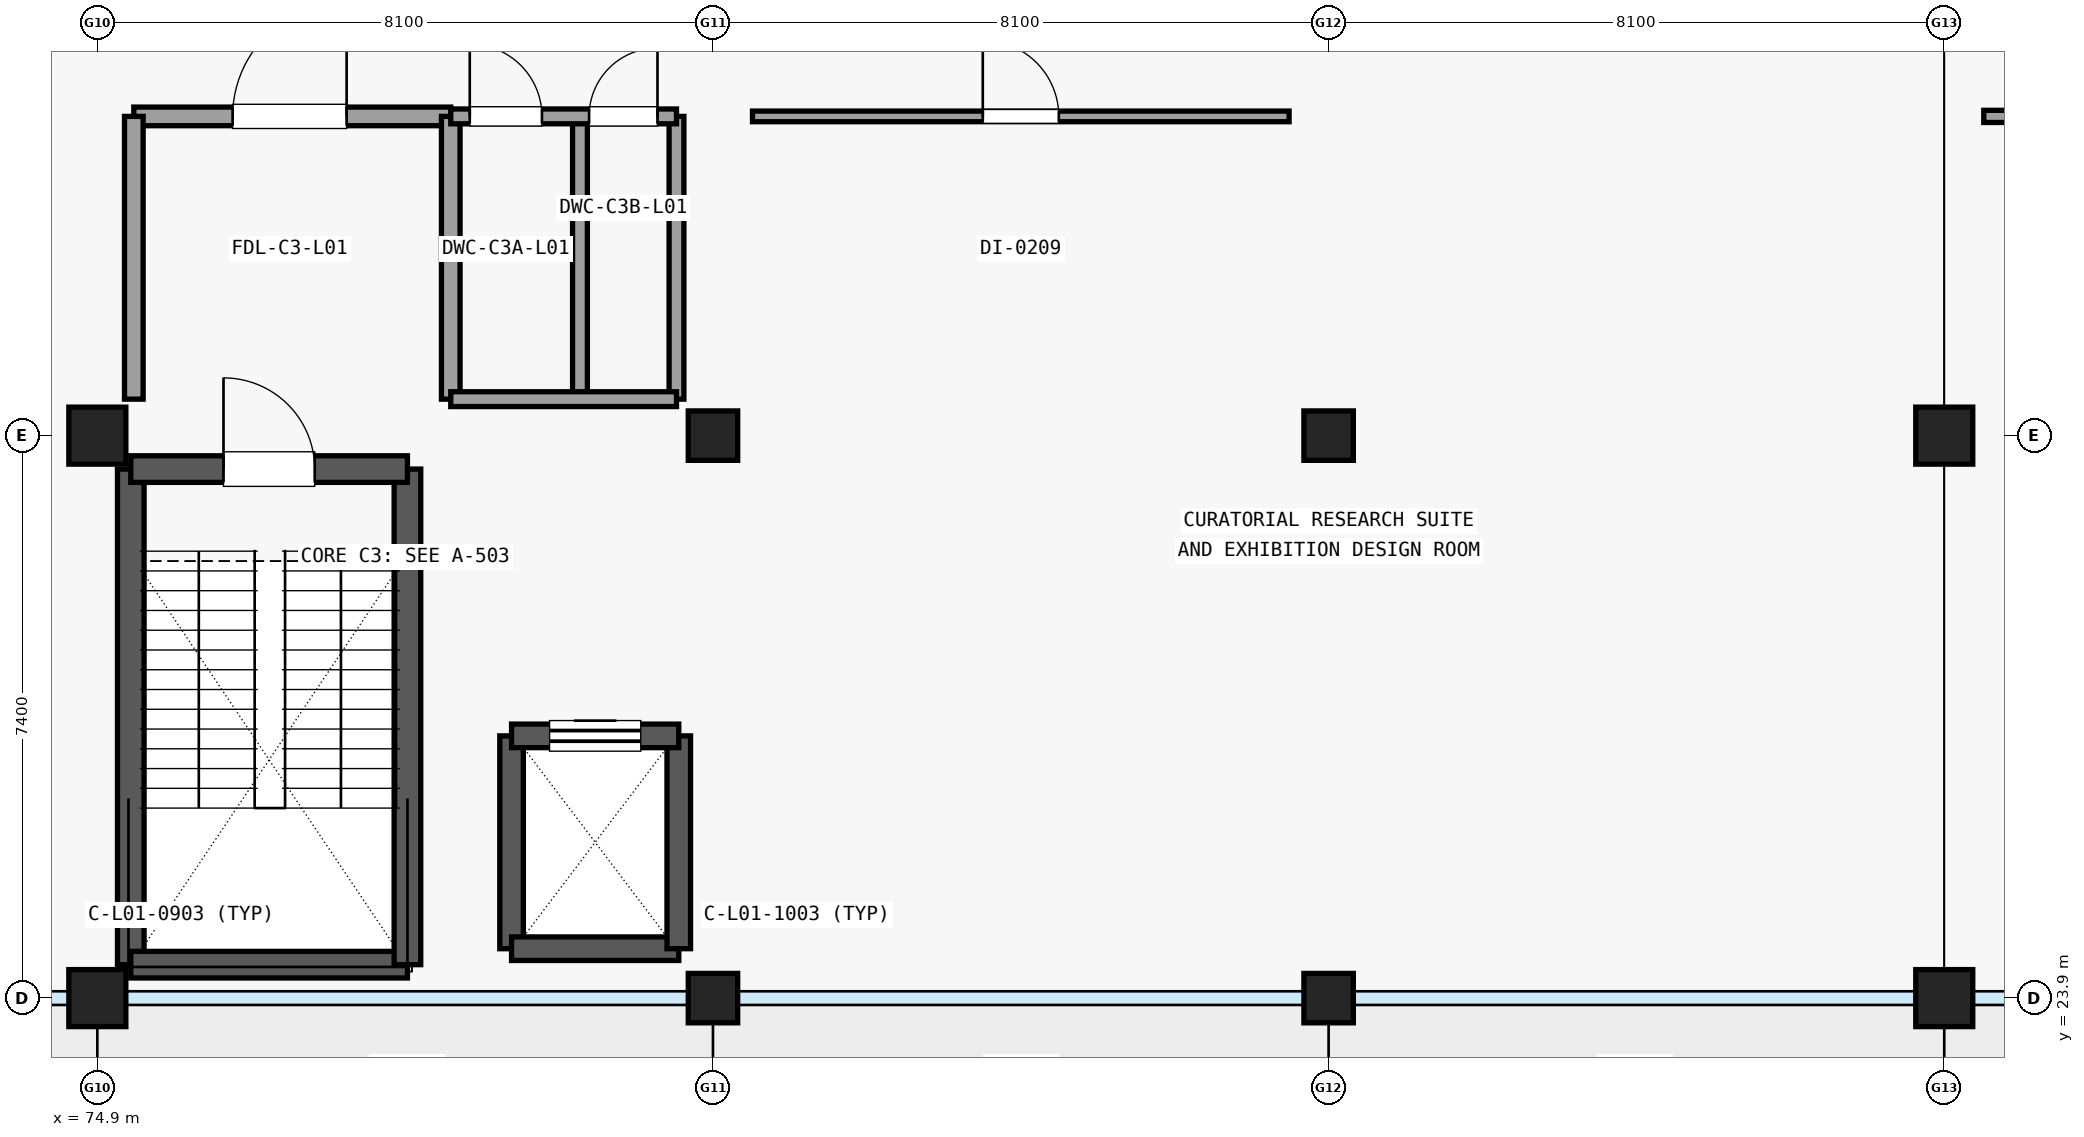
"""IFC4 building model, lengths in metres.
Left out: names, types, materials, properties, quantities, classifications, styles, units other than length and angle.
Written with IfcOpenShell. Run it as: python <this file> out.ifc"""

import sys

from ifc_helpers import new_model, si_unit, direction, frame, frame_2d, origin, origin_2d, place, context, subcontext, project, spatial, rectangle, extrude, element, fill, save


model = new_model("IFC4")
c1 = context("Model", 3, precision=1e-05, world=origin(), true_north=direction((0.0, 1.0)))
c2 = subcontext(c1, "Body", "Model", "MODEL_VIEW")
j1 = project(units=[si_unit("LENGTHUNIT", "METRE"), si_unit("PLANEANGLEUNIT", "RADIAN")], contexts=[c1])
p1 = place(None, origin())
s1 = spatial("IfcSite", under=j1, at=p1, CompositionType="ELEMENT")
p2 = place(p1, origin())
s2 = spatial("IfcBuilding", under=s1, at=p2, CompositionType="ELEMENT")
p3 = place(p2, frame((0.0, 0.0, 5.4)))
s3 = spatial("IfcBuildingStorey", under=s2, at=p3, CompositionType="ELEMENT", Elevation=5.4)
for number, where, z_axis, x_axis in (
    (1, (74.9, 23.9, 0.0), (0.0, 0.0, 1.0), (1.0, 0.0, 0.0)),
    (2, (74.9, 31.3, 0.0), (0.0, 0.0, 1.0), (1.0, 0.0, 0.0)),
):
    element("IfcColumn", number, at=place(p3, frame(where, z_axis=z_axis, x_axis=x_axis)), inside=s3, PredefinedType="COLUMN", context=c2, shape_type="SweptSolid", body=[
        extrude(rectangle(XDim=0.75, YDim=0.75, at=origin_2d()), origin(), (0.0, 0.0, 1.0), 4.56),
    ])
for number, where, z_axis, x_axis in (
    (3, (83.0, 23.9, 0.0), (0.0, 0.0, 1.0), (1.0, 0.0, 0.0)),
    (4, (83.0, 31.3, 0.0), (0.0, 0.0, 1.0), (1.0, 0.0, 0.0)),
    (5, (91.1, 23.9, 0.0), (0.0, 0.0, 1.0), (1.0, 0.0, 0.0)),
    (6, (91.1, 31.3, 0.0), (0.0, 0.0, 1.0), (1.0, 0.0, 0.0)),
):
    element("IfcColumn", number, at=place(p3, frame(where, z_axis=z_axis, x_axis=x_axis)), inside=s3, PredefinedType="COLUMN", context=c2, shape_type="SweptSolid", body=[
        extrude(rectangle(XDim=0.65, YDim=0.65, at=origin_2d()), origin(), (0.0, 0.0, 1.0), 4.56),
    ])
for number, where, z_axis, x_axis in (
    (7, (99.2, 23.9, 0.0), (0.0, 0.0, 1.0), (1.0, 0.0, 0.0)),
    (8, (99.2, 31.3, 0.0), (0.0, 0.0, 1.0), (1.0, 0.0, 0.0)),
):
    element("IfcColumn", number, at=place(p3, frame(where, z_axis=z_axis, x_axis=x_axis)), inside=s3, PredefinedType="COLUMN", context=c2, shape_type="SweptSolid", body=[
        extrude(rectangle(XDim=0.75, YDim=0.75, at=origin_2d()), origin(), (0.0, 0.0, 1.0), 4.56),
    ])
p4 = place(p3, frame((75.34, 24.34, 0.0), z_axis=(0.0, 0.0, 1.0), x_axis=(0.0, 1.0, 0.0)))
e9 = element("IfcWall", 9, at=p4, inside=s3, PredefinedType="SHEAR", context=c2, shape_type="SweptSolid", body=[
    extrude(rectangle(XDim=6.52, YDim=0.35, at=frame_2d((3.26, 0.0))), origin(), (0.0, 0.0, 1.0), 4.555),
])
p5 = place(p3, frame((75.34, 24.34, 0.0), z_axis=(0.0, 0.0, 1.0), x_axis=(1.0, 0.0, 0.0)))
e10 = element("IfcWall", 10, at=p5, inside=s3, PredefinedType="SHEAR", context=c2, shape_type="SweptSolid", body=[
    extrude(rectangle(XDim=3.64, YDim=0.35, at=frame_2d((1.82, 0.0))), origin(), (0.0, 0.0, 1.0), 4.555),
])
p6 = place(p3, frame((78.98, 24.34, 0.0), z_axis=(0.0, 0.0, 1.0), x_axis=(0.0, 1.0, 0.0)))
e11 = element("IfcWall", 11, at=p6, inside=s3, PredefinedType="SHEAR", context=c2, shape_type="SweptSolid", body=[
    extrude(rectangle(XDim=6.52, YDim=0.35, at=frame_2d((3.26, 0.0))), origin(), (0.0, 0.0, 1.0), 4.555),
])
p7 = place(p3, frame((75.34, 30.86, 0.0), z_axis=(0.0, 0.0, 1.0), x_axis=(1.0, 0.0, 0.0)))
e12 = element("IfcWall", 12, at=p7, inside=s3, PredefinedType="SHEAR", context=c2, shape_type="SweptSolid", body=[
    extrude(rectangle(XDim=3.64, YDim=0.35, at=frame_2d((1.82, 0.0))), origin(), (0.0, 0.0, 1.0), 4.555),
])
p8 = place(p7, frame((1.22, 0.0, 0.0)))
e13 = element("IfcOpeningElement", 13, at=p8, cuts=e12, PredefinedType="OPENING", context=c2, shape_type="SweptSolid", body=[
    extrude(rectangle(XDim=1.2, YDim=2.15, at=frame_2d((0.6, 1.075))), frame((0.0, 0.185, 0.0), z_axis=(0.0, -1.0, 0.0), x_axis=(1.0, 0.0, 0.0)), (0.0, 0.0, 1.0), 0.37),
])
p9 = place(p3, frame((80.35, 24.55, 0.0), z_axis=(0.0, 0.0, 1.0), x_axis=(0.0, 1.0, 0.0)))
e14 = element("IfcWall", 14, at=p9, inside=s3, PredefinedType="SHEAR", context=c2, shape_type="SweptSolid", body=[
    extrude(rectangle(XDim=2.8, YDim=0.31, at=frame_2d((1.4, 0.0))), origin(), (0.0, 0.0, 1.0), 4.555),
])
p10 = place(p3, frame((80.35, 24.55, 0.0), z_axis=(0.0, 0.0, 1.0), x_axis=(1.0, 0.0, 0.0)))
e15 = element("IfcWall", 15, at=p10, inside=s3, PredefinedType="SHEAR", context=c2, shape_type="SweptSolid", body=[
    extrude(rectangle(XDim=2.2, YDim=0.31, at=frame_2d((1.1, 0.0))), origin(), (0.0, 0.0, 1.0), 4.555),
])
p11 = place(p3, frame((82.55, 24.55, 0.0), z_axis=(0.0, 0.0, 1.0), x_axis=(0.0, 1.0, 0.0)))
e16 = element("IfcWall", 16, at=p11, inside=s3, PredefinedType="SHEAR", context=c2, shape_type="SweptSolid", body=[
    extrude(rectangle(XDim=2.8, YDim=0.31, at=frame_2d((1.4, 0.0))), origin(), (0.0, 0.0, 1.0), 4.555),
])
p12 = place(p3, frame((80.35, 27.35, 0.0), z_axis=(0.0, 0.0, 1.0), x_axis=(1.0, 0.0, 0.0)))
e17 = element("IfcWall", 17, at=p12, inside=s3, PredefinedType="SHEAR", context=c2, shape_type="SweptSolid", body=[
    extrude(rectangle(XDim=2.2, YDim=0.31, at=frame_2d((1.1, 0.0))), origin(), (0.0, 0.0, 1.0), 4.555),
])
p13 = place(p12, frame((0.5, 0.0, 0.0)))
e18 = element("IfcOpeningElement", 18, at=p13, cuts=e17, PredefinedType="OPENING", context=c2, shape_type="SweptSolid", body=[
    extrude(rectangle(XDim=1.2, YDim=2.15, at=frame_2d((0.6, 1.075))), frame((0.0, 0.165, 0.0), z_axis=(0.0, -1.0, 0.0), x_axis=(1.0, 0.0, 0.0)), (0.0, 0.0, 1.0), 0.33),
])
p14 = place(p3, frame((75.38, 35.5, 0.0), z_axis=(0.0, 0.0, 1.0), x_axis=(1.0, 0.0, 0.0)))
e19 = element("IfcWall", 19, at=p14, inside=s3, PredefinedType="PARTITIONING", context=c2, shape_type="SweptSolid", body=[
    extrude(rectangle(XDim=4.17, YDim=0.245, at=frame_2d((2.085, 0.0))), origin(), (0.0, 0.0, 1.0), 3.8),
])
p15 = place(p14, frame((1.3, 0.0, 0.0)))
e20 = element("IfcOpeningElement", 20, at=p15, cuts=e19, PredefinedType="OPENING", context=c2, shape_type="SweptSolid", body=[
    extrude(rectangle(XDim=1.5, YDim=2.15, at=frame_2d((0.75, 1.075))), frame((0.0, 0.133, 0.0), z_axis=(0.0, -1.0, 0.0), x_axis=(1.0, 0.0, 0.0)), (0.0, 0.0, 1.0), 0.265),
])
for number, where, z_axis, x_axis in (
    (21, (75.38, 31.78, 0.0), (0.0, 0.0, 1.0), (0.0, 1.0, 0.0)),
    (22, (79.55, 31.78, 0.0), (0.0, 0.0, 1.0), (0.0, 1.0, 0.0)),
):
    element("IfcWall", number, at=place(p3, frame(where, z_axis=z_axis, x_axis=x_axis)), inside=s3, PredefinedType="PARTITIONING", context=c2, shape_type="SweptSolid", body=[
        extrude(rectangle(XDim=3.72, YDim=0.245, at=frame_2d((1.86, 0.0))), origin(), (0.0, 0.0, 1.0), 3.8),
    ])
for number, where, z_axis, x_axis in (
    (23, (81.25, 31.78, 0.0), (0.0, 0.0, 1.0), (0.0, 1.0, 0.0)),
    (24, (82.52, 31.78, 0.0), (0.0, 0.0, 1.0), (0.0, 1.0, 0.0)),
):
    element("IfcWall", number, at=place(p3, frame(where, z_axis=z_axis, x_axis=x_axis)), inside=s3, PredefinedType="PARTITIONING", context=c2, shape_type="SweptSolid", body=[
        extrude(rectangle(XDim=3.72, YDim=0.195, at=frame_2d((1.86, 0.0))), origin(), (0.0, 0.0, 1.0), 3.8),
    ])
p16 = place(p3, frame((79.55, 31.78, 0.0), z_axis=(0.0, 0.0, 1.0), x_axis=(1.0, 0.0, 0.0)))
e25 = element("IfcWall", 25, at=p16, inside=s3, PredefinedType="PARTITIONING", context=c2, shape_type="SweptSolid", body=[
    extrude(rectangle(XDim=2.97, YDim=0.195, at=frame_2d((1.485, 0.0))), origin(), (0.0, 0.0, 1.0), 3.8),
])
p17 = place(p3, frame((79.55, 35.5, 0.0), z_axis=(0.0, 0.0, 1.0), x_axis=(1.0, 0.0, 0.0)))
e26 = element("IfcWall", 26, at=p17, inside=s3, PredefinedType="PARTITIONING", context=c2, shape_type="SweptSolid", body=[
    extrude(rectangle(XDim=2.97, YDim=0.195, at=frame_2d((1.485, 0.0))), origin(), (0.0, 0.0, 1.0), 4.545),
])
p18 = place(p17, frame((0.25, 0.0, 0.0)))
e27 = element("IfcOpeningElement", 27, at=p18, cuts=e26, PredefinedType="OPENING", context=c2, shape_type="SweptSolid", body=[
    extrude(rectangle(XDim=0.95, YDim=2.1, at=frame_2d((0.475, 1.05))), frame((0.0, 0.107, 0.0), z_axis=(0.0, -1.0, 0.0), x_axis=(1.0, 0.0, 0.0)), (0.0, 0.0, 1.0), 0.215),
])
p19 = place(p17, frame((1.82, 0.0, 0.0)))
e28 = element("IfcOpeningElement", 28, at=p19, cuts=e26, PredefinedType="OPENING", context=c2, shape_type="SweptSolid", body=[
    extrude(rectangle(XDim=0.9, YDim=2.1, at=frame_2d((0.45, 1.05))), frame((0.0, 0.107, 0.0), z_axis=(0.0, -1.0, 0.0), x_axis=(1.0, 0.0, 0.0)), (0.0, 0.0, 1.0), 0.215),
])
p20 = place(p3, frame((83.52, 35.5, 0.0), z_axis=(0.0, 0.0, 1.0), x_axis=(1.0, 0.0, 0.0)))
e29 = element("IfcWall", 29, at=p20, inside=s3, PredefinedType="PARTITIONING", context=c2, shape_type="SweptSolid", body=[
    extrude(rectangle(XDim=7.06, YDim=0.14, at=frame_2d((3.53, 0.0))), origin(), (0.0, 0.0, 1.0), 4.545),
])
p21 = place(p20, frame((3.03, 0.0, 0.0)))
e30 = element("IfcOpeningElement", 30, at=p21, cuts=e29, PredefinedType="OPENING", context=c2, shape_type="SweptSolid", body=[
    extrude(rectangle(XDim=1.0, YDim=2.12, at=frame_2d((0.5, 1.06))), frame((0.0, 0.08, 0.0), z_axis=(0.0, -1.0, 0.0), x_axis=(1.0, 0.0, 0.0)), (0.0, 0.0, 1.0), 0.16),
])
p22 = place(p3, frame((99.72, 35.5, 0.0), z_axis=(0.0, 0.0, 1.0), x_axis=(1.0, 0.0, 0.0)))
e31 = element("IfcWall", 31, at=p22, inside=s3, PredefinedType="PARTITIONING", context=c2, shape_type="SweptSolid", body=[
    extrude(rectangle(XDim=7.06, YDim=0.16, at=frame_2d((3.53, 0.0))), origin(), (0.0, 0.0, 1.0), 3.85),
])
p23 = place(p22, frame((2.855, 0.0, 0.0)))
e32 = element("IfcOpeningElement", 32, at=p23, cuts=e31, PredefinedType="OPENING", context=c2, shape_type="SweptSolid", body=[
    extrude(rectangle(XDim=1.35, YDim=2.2, at=frame_2d((0.675, 1.1))), frame((0.0, 0.09, 0.0), z_axis=(0.0, -1.0, 0.0), x_axis=(1.0, 0.0, 0.0)), (0.0, 0.0, 1.0), 0.18),
])
p24 = place(p8, origin())
e33 = element("IfcDoor", 33, at=p24, inside=s3, OperationType="SINGLE_SWING_LEFT", PredefinedType="DOOR", context=c2, shape_type="SweptSolid", body=[
    extrude(rectangle(XDim=1.2, YDim=2.15, at=frame_2d((0.6, 1.075))), frame((0.0, 0.025, 0.0), z_axis=(0.0, -1.0, 0.0), x_axis=(1.0, 0.0, 0.0)), (0.0, 0.0, 1.0), 0.05),
])
fill(e13, e33)
p25 = place(p13, origin())
e34 = element("IfcDoor", 34, at=p25, inside=s3, OperationType="SLIDING_TO_LEFT", PredefinedType="DOOR", context=c2, shape_type="SweptSolid", body=[
    extrude(rectangle(XDim=1.2, YDim=2.15, at=frame_2d((0.6, 1.075))), frame((0.0, 0.025, 0.0), z_axis=(0.0, -1.0, 0.0), x_axis=(1.0, 0.0, 0.0)), (0.0, 0.0, 1.0), 0.05),
])
fill(e18, e34)
p26 = place(p15, origin())
e35 = element("IfcDoor", 35, at=p26, inside=s3, OperationType="SINGLE_SWING_RIGHT", PredefinedType="DOOR", context=c2, shape_type="SweptSolid", body=[
    extrude(rectangle(XDim=1.5, YDim=2.15, at=frame_2d((0.75, 1.075))), frame((0.0, 0.025, 0.0), z_axis=(0.0, -1.0, 0.0), x_axis=(1.0, 0.0, 0.0)), (0.0, 0.0, 1.0), 0.05),
])
fill(e20, e35)
p27 = place(p18, origin())
e36 = element("IfcDoor", 36, at=p27, inside=s3, OperationType="SINGLE_SWING_LEFT", PredefinedType="DOOR", context=c2, shape_type="SweptSolid", body=[
    extrude(rectangle(XDim=0.95, YDim=2.1, at=frame_2d((0.475, 1.05))), frame((0.0, 0.025, 0.0), z_axis=(0.0, -1.0, 0.0), x_axis=(1.0, 0.0, 0.0)), (0.0, 0.0, 1.0), 0.05),
])
fill(e27, e36)
p28 = place(p19, origin())
e37 = element("IfcDoor", 37, at=p28, inside=s3, OperationType="SINGLE_SWING_RIGHT", PredefinedType="DOOR", context=c2, shape_type="SweptSolid", body=[
    extrude(rectangle(XDim=0.9, YDim=2.1, at=frame_2d((0.45, 1.05))), frame((0.0, 0.025, 0.0), z_axis=(0.0, -1.0, 0.0), x_axis=(1.0, 0.0, 0.0)), (0.0, 0.0, 1.0), 0.05),
])
fill(e28, e37)
p29 = place(p21, origin())
e38 = element("IfcDoor", 38, at=p29, inside=s3, OperationType="SINGLE_SWING_LEFT", PredefinedType="DOOR", context=c2, shape_type="SweptSolid", body=[
    extrude(rectangle(XDim=1.0, YDim=2.12, at=frame_2d((0.5, 1.06))), frame((0.0, 0.025, 0.0), z_axis=(0.0, -1.0, 0.0), x_axis=(1.0, 0.0, 0.0)), (0.0, 0.0, 1.0), 0.05),
])
fill(e30, e38)
save(model, sys.argv[1])
